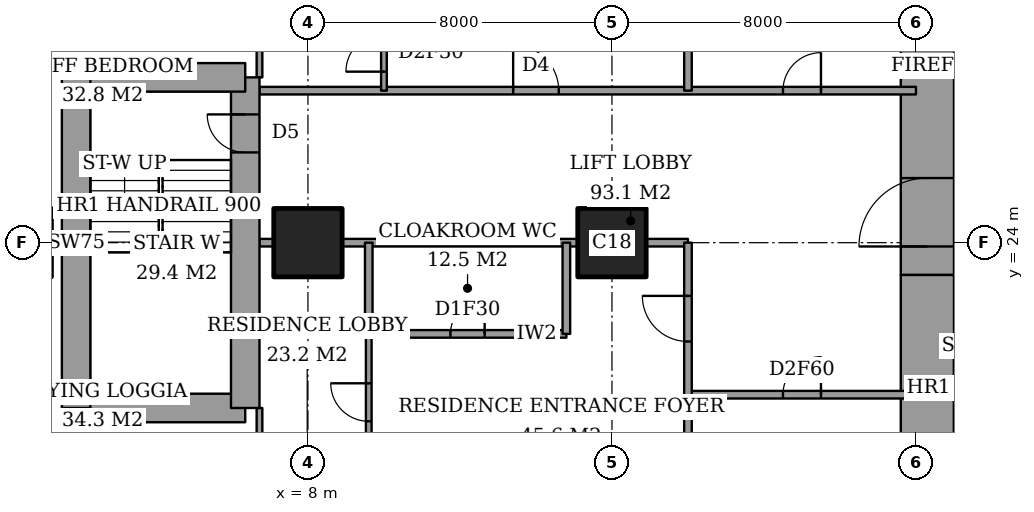
"""IFC4 building model, lengths in metres.
Left out: names, types, materials, properties, quantities, classifications, styles, units other than length and angle.
Written with IfcOpenShell. Run it as: python <this file> out.ifc"""

import sys

from ifc_helpers import new_model, si_unit, direction, frame, frame_2d, origin, origin_2d, place, context, subcontext, project, spatial, rectangle, extrude, element, fill, save


model = new_model("IFC4")
c1 = context("Model", 3, precision=1e-05, world=origin(), true_north=direction((0.0, 1.0)))
c2 = subcontext(c1, "Body", "Model", "MODEL_VIEW")
j1 = project(units=[si_unit("LENGTHUNIT", "METRE"), si_unit("PLANEANGLEUNIT", "RADIAN")], contexts=[c1])
p1 = place(None, origin())
s1 = spatial("IfcSite", under=j1, at=p1, CompositionType="ELEMENT")
p2 = place(p1, origin())
s2 = spatial("IfcBuilding", under=s1, at=p2, CompositionType="ELEMENT")
p3 = place(p2, frame((0.0, 0.0, 182.2)))
s3 = spatial("IfcBuildingStorey", under=s2, at=p3, CompositionType="ELEMENT", Elevation=182.2)
for number, where, z_axis, x_axis in (
    (1, (8.0, 24.0, 0.0), (0.0, 0.0, 1.0), (1.0, 0.0, 0.0)),
    (2, (16.0, 24.0, 0.0), (0.0, 0.0, 1.0), (1.0, 0.0, 0.0)),
):
    element("IfcColumn", number, at=place(p3, frame(where, z_axis=z_axis, x_axis=x_axis)), inside=s3, PredefinedType="COLUMN", context=c2, shape_type="SweptSolid", body=[
        extrude(rectangle(XDim=1.8, YDim=1.8, at=origin_2d()), origin(), (0.0, 0.0, 1.0), 3.6),
    ])
p4 = place(p3, frame((24.3, 13.0, 0.0), z_axis=(0.0, 0.0, 1.0), x_axis=(0.0, 1.0, 0.0)))
e3 = element("IfcWall", 3, at=p4, inside=s3, PredefinedType="SHEAR", context=c2, shape_type="SweptSolid", body=[
    extrude(rectangle(XDim=10.15, YDim=1.4, at=frame_2d((5.075, 0.0))), origin(), (0.0, 0.0, 1.0), 3.6),
])
p5 = place(p3, frame((24.3, 23.15, 0.0), z_axis=(0.0, 0.0, 1.0), x_axis=(0.0, 1.0, 0.0)))
e4 = element("IfcWall", 4, at=p5, inside=s3, PredefinedType="SHEAR", context=c2, shape_type="SweptSolid", body=[
    extrude(rectangle(XDim=11.85, YDim=1.4, at=frame_2d((5.925, 0.0))), origin(), (0.0, 0.0, 1.0), 3.6),
])
p6 = place(p5, frame((0.75, 0.0, 0.0)))
e5 = element("IfcOpeningElement", 5, at=p6, cuts=e4, PredefinedType="OPENING", context=c2, shape_type="SweptSolid", body=[
    extrude(rectangle(XDim=1.8, YDim=2.4, at=frame_2d((0.9, 1.2))), frame((0.0, 0.71, 0.0), z_axis=(0.0, -1.0, 0.0), x_axis=(1.0, 0.0, 0.0)), (0.0, 0.0, 1.0), 1.42),
])
p7 = place(p3, frame((1.9, 19.65, 0.0), z_axis=(0.0, 0.0, 1.0), x_axis=(1.0, 0.0, 0.0)))
e6 = element("IfcWall", 6, at=p7, inside=s3, PredefinedType="SHEAR", context=c2, shape_type="SweptSolid", body=[
    extrude(rectangle(XDim=4.45, YDim=0.75, at=frame_2d((2.225, 0.0))), origin(), (0.0, 0.0, 1.0), 3.6),
])
p8 = place(p3, frame((6.35, 19.65, 0.0), z_axis=(0.0, 0.0, 1.0), x_axis=(0.0, 1.0, 0.0)))
e7 = element("IfcWall", 7, at=p8, inside=s3, PredefinedType="SHEAR", context=c2, shape_type="SweptSolid", body=[
    extrude(rectangle(XDim=8.7, YDim=0.75, at=frame_2d((4.35, 0.0))), origin(), (0.0, 0.0, 1.0), 3.6),
])
p9 = place(p8, frame((6.725, 0.0, 0.0)))
e8 = element("IfcOpeningElement", 8, at=p9, cuts=e7, PredefinedType="OPENING", context=c2, shape_type="SweptSolid", body=[
    extrude(rectangle(XDim=1.0, YDim=2.1, at=frame_2d((0.5, 1.05))), frame((0.0, 0.385, 0.0), z_axis=(0.0, -1.0, 0.0), x_axis=(1.0, 0.0, 0.0)), (0.0, 0.0, 1.0), 0.77),
])
p10 = place(p3, frame((6.35, 28.35, 0.0), z_axis=(0.0, 0.0, 1.0), x_axis=(-1.0, 0.0, 0.0)))
e9 = element("IfcWall", 9, at=p10, inside=s3, PredefinedType="SHEAR", context=c2, shape_type="SweptSolid", body=[
    extrude(rectangle(XDim=4.45, YDim=0.75, at=frame_2d((2.225, 0.0))), origin(), (0.0, 0.0, 1.0), 3.6),
])
p11 = place(p3, frame((1.9, 28.35, 0.0), z_axis=(0.0, 0.0, 1.0), x_axis=(0.0, -1.0, 0.0)))
e10 = element("IfcWall", 10, at=p11, inside=s3, PredefinedType="SHEAR", context=c2, shape_type="SweptSolid", body=[
    extrude(rectangle(XDim=8.7, YDim=0.75, at=frame_2d((4.35, 0.0))), origin(), (0.0, 0.0, 1.0), 3.6),
])
p12 = place(p3, frame((18.0, 20.0, 0.0), z_axis=(0.0, 0.0, 1.0), x_axis=(1.0, 0.0, 0.0)))
e11 = element("IfcWall", 11, at=p12, inside=s3, PredefinedType="PARTITIONING", context=c2, shape_type="SweptSolid", body=[
    extrude(rectangle(XDim=6.0, YDim=0.2, at=frame_2d((3.0, 0.0))), origin(), (0.0, 0.0, 1.0), 3.35),
])
p13 = place(p12, frame((2.5, 0.0, 0.0)))
e12 = element("IfcOpeningElement", 12, at=p13, cuts=e11, PredefinedType="OPENING", context=c2, shape_type="SweptSolid", body=[
    extrude(rectangle(XDim=1.0, YDim=2.1, at=frame_2d((0.5, 1.05))), frame((0.0, 0.11, 0.0), z_axis=(0.0, -1.0, 0.0), x_axis=(1.0, 0.0, 0.0)), (0.0, 0.0, 1.0), 0.22),
])
p14 = place(p3, frame((9.6, 21.6, 0.0), z_axis=(0.0, 0.0, 1.0), x_axis=(1.0, 0.0, 0.0)))
e13 = element("IfcWall", 13, at=p14, inside=s3, PredefinedType="PARTITIONING", context=c2, shape_type="SweptSolid", body=[
    extrude(rectangle(XDim=5.2, YDim=0.2, at=frame_2d((2.6, 0.0))), origin(), (0.0, 0.0, 1.0), 3.35),
])
p15 = place(p14, frame((2.15, 0.0, 0.0)))
e14 = element("IfcOpeningElement", 14, at=p15, cuts=e13, PredefinedType="OPENING", context=c2, shape_type="SweptSolid", body=[
    extrude(rectangle(XDim=0.9, YDim=2.1, at=frame_2d((0.45, 1.05))), frame((0.0, 0.11, 0.0), z_axis=(0.0, -1.0, 0.0), x_axis=(1.0, 0.0, 0.0)), (0.0, 0.0, 1.0), 0.22),
])
p16 = place(p3, frame((6.725, 24.0, 0.0), z_axis=(0.0, 0.0, 1.0), x_axis=(1.0, 0.0, 0.0)))
e15 = element("IfcWall", 15, at=p16, inside=s3, PredefinedType="PARTITIONING", context=c2, shape_type="SweptSolid", body=[
    extrude(rectangle(XDim=0.375, YDim=0.2, at=frame_2d((0.188, 0.0))), origin(), (0.0, 0.0, 1.0), 3.35),
])
p17 = place(p3, frame((8.9, 24.0, 0.0), z_axis=(0.0, 0.0, 1.0), x_axis=(1.0, 0.0, 0.0)))
e16 = element("IfcWall", 16, at=p17, inside=s3, PredefinedType="PARTITIONING", context=c2, shape_type="SweptSolid", body=[
    extrude(rectangle(XDim=6.2, YDim=0.2, at=frame_2d((3.1, 0.0))), origin(), (0.0, 0.0, 1.0), 3.35),
])
p18 = place(p3, frame((16.9, 24.0, 0.0), z_axis=(0.0, 0.0, 1.0), x_axis=(1.0, 0.0, 0.0)))
e17 = element("IfcWall", 17, at=p18, inside=s3, PredefinedType="PARTITIONING", context=c2, shape_type="SweptSolid", body=[
    extrude(rectangle(XDim=1.1, YDim=0.2, at=frame_2d((0.55, 0.0))), origin(), (0.0, 0.0, 1.0), 3.35),
])
p19 = place(p3, frame((6.725, 28.0, 0.0), z_axis=(0.0, 0.0, 1.0), x_axis=(1.0, 0.0, 0.0)))
e18 = element("IfcWall", 18, at=p19, inside=s3, PredefinedType="PARTITIONING", context=c2, shape_type="SweptSolid", body=[
    extrude(rectangle(XDim=17.275, YDim=0.2, at=frame_2d((8.637, 0.0))), origin(), (0.0, 0.0, 1.0), 3.35),
])
p20 = place(p19, frame((6.675, 0.0, 0.0)))
e19 = element("IfcOpeningElement", 19, at=p20, cuts=e18, PredefinedType="OPENING", context=c2, shape_type="SweptSolid", body=[
    extrude(rectangle(XDim=1.2, YDim=2.4, at=frame_2d((0.6, 1.2))), frame((0.0, 0.11, 0.0), z_axis=(0.0, -1.0, 0.0), x_axis=(1.0, 0.0, 0.0)), (0.0, 0.0, 1.0), 0.22),
])
p21 = place(p19, frame((13.775, 0.0, 0.0)))
e20 = element("IfcOpeningElement", 20, at=p21, cuts=e18, PredefinedType="OPENING", context=c2, shape_type="SweptSolid", body=[
    extrude(rectangle(XDim=1.0, YDim=2.1, at=frame_2d((0.5, 1.05))), frame((0.0, 0.11, 0.0), z_axis=(0.0, -1.0, 0.0), x_axis=(1.0, 0.0, 0.0)), (0.0, 0.0, 1.0), 0.22),
])
p22 = place(p3, frame((6.725, 17.2, 0.0), z_axis=(0.0, 0.0, 1.0), x_axis=(0.0, 1.0, 0.0)))
e21 = element("IfcWall", 21, at=p22, inside=s3, PredefinedType="PARTITIONING", context=c2, shape_type="SweptSolid", body=[
    extrude(rectangle(XDim=2.45, YDim=0.15, at=frame_2d((1.225, 0.0))), origin(), (0.0, 0.0, 1.0), 3.35),
])
p23 = place(p22, frame((0.587, 0.0, 0.0)))
e22 = element("IfcOpeningElement", 22, at=p23, cuts=e21, PredefinedType="OPENING", context=c2, shape_type="SweptSolid", body=[
    extrude(rectangle(XDim=0.9, YDim=2.1, at=frame_2d((0.45, 1.05))), frame((0.0, 0.085, 0.0), z_axis=(0.0, -1.0, 0.0), x_axis=(1.0, 0.0, 0.0)), (0.0, 0.0, 1.0), 0.17),
])
p24 = place(p3, frame((6.725, 28.35, 0.0), z_axis=(0.0, 0.0, 1.0), x_axis=(0.0, 1.0, 0.0)))
e23 = element("IfcWall", 23, at=p24, inside=s3, PredefinedType="PARTITIONING", context=c2, shape_type="SweptSolid", body=[
    extrude(rectangle(XDim=2.45, YDim=0.15, at=frame_2d((1.225, 0.0))), origin(), (0.0, 0.0, 1.0), 3.35),
])
p25 = place(p24, frame((0.913, 0.0, 0.0)))
e24 = element("IfcOpeningElement", 24, at=p25, cuts=e23, PredefinedType="OPENING", context=c2, shape_type="SweptSolid", body=[
    extrude(rectangle(XDim=1.0, YDim=2.1, at=frame_2d((0.5, 1.05))), frame((0.0, 0.085, 0.0), z_axis=(0.0, -1.0, 0.0), x_axis=(1.0, 0.0, 0.0)), (0.0, 0.0, 1.0), 0.17),
])
p26 = place(p3, frame((9.6, 21.6, 0.0), z_axis=(0.0, 0.0, 1.0), x_axis=(0.0, 1.0, 0.0)))
e25 = element("IfcWall", 25, at=p26, inside=s3, PredefinedType="PARTITIONING", context=c2, shape_type="SweptSolid", body=[
    extrude(rectangle(XDim=2.4, YDim=0.2, at=frame_2d((1.2, 0.0))), origin(), (0.0, 0.0, 1.0), 3.35),
])
p27 = place(p3, frame((9.6, 10.6, 0.0), z_axis=(0.0, 0.0, 1.0), x_axis=(0.0, 1.0, 0.0)))
e26 = element("IfcWall", 26, at=p27, inside=s3, PredefinedType="PARTITIONING", context=c2, shape_type="SweptSolid", body=[
    extrude(rectangle(XDim=11.0, YDim=0.15, at=frame_2d((5.5, 0.0))), origin(), (0.0, 0.0, 1.0), 3.35),
])
p28 = place(p27, frame((8.7, 0.0, 0.0)))
e27 = element("IfcOpeningElement", 27, at=p28, cuts=e26, PredefinedType="OPENING", context=c2, shape_type="SweptSolid", body=[
    extrude(rectangle(XDim=1.0, YDim=2.1, at=frame_2d((0.5, 1.05))), frame((0.0, 0.085, 0.0), z_axis=(0.0, -1.0, 0.0), x_axis=(1.0, 0.0, 0.0)), (0.0, 0.0, 1.0), 0.17),
])
p29 = place(p3, frame((10.0, 28.0, 0.0), z_axis=(0.0, 0.0, 1.0), x_axis=(0.0, 1.0, 0.0)))
e28 = element("IfcWall", 28, at=p29, inside=s3, PredefinedType="PARTITIONING", context=c2, shape_type="SweptSolid", body=[
    extrude(rectangle(XDim=9.4, YDim=0.15, at=frame_2d((4.7, 0.0))), origin(), (0.0, 0.0, 1.0), 3.35),
])
p30 = place(p29, frame((0.5, 0.0, 0.0)))
e29 = element("IfcOpeningElement", 29, at=p30, cuts=e28, PredefinedType="OPENING", context=c2, shape_type="SweptSolid", body=[
    extrude(rectangle(XDim=1.0, YDim=2.1, at=frame_2d((0.5, 1.05))), frame((0.0, 0.085, 0.0), z_axis=(0.0, -1.0, 0.0), x_axis=(1.0, 0.0, 0.0)), (0.0, 0.0, 1.0), 0.17),
])
p31 = place(p3, frame((14.8, 21.6, 0.0), z_axis=(0.0, 0.0, 1.0), x_axis=(0.0, 1.0, 0.0)))
e30 = element("IfcWall", 30, at=p31, inside=s3, PredefinedType="PARTITIONING", context=c2, shape_type="SweptSolid", body=[
    extrude(rectangle(XDim=2.4, YDim=0.2, at=frame_2d((1.2, 0.0))), origin(), (0.0, 0.0, 1.0), 3.35),
])
p32 = place(p3, frame((18.0, 9.8, 0.0), z_axis=(0.0, 0.0, 1.0), x_axis=(0.0, 1.0, 0.0)))
e31 = element("IfcWall", 31, at=p32, inside=s3, PredefinedType="PARTITIONING", context=c2, shape_type="SweptSolid", body=[
    extrude(rectangle(XDim=14.2, YDim=0.2, at=frame_2d((7.1, 0.0))), origin(), (0.0, 0.0, 1.0), 3.35),
])
p33 = place(p32, frame((11.6, 0.0, 0.0)))
e32 = element("IfcOpeningElement", 32, at=p33, cuts=e31, PredefinedType="OPENING", context=c2, shape_type="SweptSolid", body=[
    extrude(rectangle(XDim=1.2, YDim=2.4, at=frame_2d((0.6, 1.2))), frame((0.0, 0.11, 0.0), z_axis=(0.0, -1.0, 0.0), x_axis=(1.0, 0.0, 0.0)), (0.0, 0.0, 1.0), 0.22),
])
p34 = place(p3, frame((18.0, 28.0, 0.0), z_axis=(0.0, 0.0, 1.0), x_axis=(0.0, 1.0, 0.0)))
e33 = element("IfcWall", 33, at=p34, inside=s3, PredefinedType="PARTITIONING", context=c2, shape_type="SweptSolid", body=[
    extrude(rectangle(XDim=10.2, YDim=0.2, at=frame_2d((5.1, 0.0))), origin(), (0.0, 0.0, 1.0), 3.35),
])
p35 = place(p28, origin())
e34 = element("IfcDoor", 34, at=p35, inside=s3, OperationType="SINGLE_SWING_LEFT", PredefinedType="DOOR", context=c2, shape_type="SweptSolid", body=[
    extrude(rectangle(XDim=1.0, YDim=2.1, at=frame_2d((0.5, 1.05))), frame((0.0, 0.025, 0.0), z_axis=(0.0, -1.0, 0.0), x_axis=(1.0, 0.0, 0.0)), (0.0, 0.0, 1.0), 0.05),
])
fill(e27, e34)
p36 = place(p15, origin())
e35 = element("IfcDoor", 35, at=p36, inside=s3, OperationType="SINGLE_SWING_LEFT", PredefinedType="DOOR", context=c2, shape_type="SweptSolid", body=[
    extrude(rectangle(XDim=0.9, YDim=2.1, at=frame_2d((0.45, 1.05))), frame((0.0, 0.025, 0.0), z_axis=(0.0, -1.0, 0.0), x_axis=(1.0, 0.0, 0.0)), (0.0, 0.0, 1.0), 0.05),
])
fill(e14, e35)
p37 = place(p33, origin())
e36 = element("IfcDoor", 36, at=p37, inside=s3, OperationType="SINGLE_SWING_LEFT", PredefinedType="DOOR", context=c2, shape_type="SweptSolid", body=[
    extrude(rectangle(XDim=1.2, YDim=2.4, at=frame_2d((0.6, 1.2))), frame((0.0, 0.025, 0.0), z_axis=(0.0, -1.0, 0.0), x_axis=(1.0, 0.0, 0.0)), (0.0, 0.0, 1.0), 0.05),
])
fill(e32, e36)
p38 = place(p30, origin())
e37 = element("IfcDoor", 37, at=p38, inside=s3, OperationType="SINGLE_SWING_RIGHT", PredefinedType="DOOR", context=c2, shape_type="SweptSolid", body=[
    extrude(rectangle(XDim=1.0, YDim=2.1, at=frame_2d((0.5, 1.05))), frame((0.0, 0.025, 0.0), z_axis=(0.0, -1.0, 0.0), x_axis=(1.0, 0.0, 0.0)), (0.0, 0.0, 1.0), 0.05),
])
fill(e29, e37)
p39 = place(p20, origin())
e38 = element("IfcDoor", 38, at=p39, inside=s3, OperationType="SINGLE_SWING_RIGHT", PredefinedType="DOOR", context=c2, shape_type="SweptSolid", body=[
    extrude(rectangle(XDim=1.2, YDim=2.4, at=frame_2d((0.6, 1.2))), frame((0.0, 0.025, 0.0), z_axis=(0.0, -1.0, 0.0), x_axis=(1.0, 0.0, 0.0)), (0.0, 0.0, 1.0), 0.05),
])
fill(e19, e38)
p40 = place(p21, origin())
e39 = element("IfcDoor", 39, at=p40, inside=s3, OperationType="SINGLE_SWING_LEFT", PredefinedType="DOOR", context=c2, shape_type="SweptSolid", body=[
    extrude(rectangle(XDim=1.0, YDim=2.1, at=frame_2d((0.5, 1.05))), frame((0.0, 0.025, 0.0), z_axis=(0.0, -1.0, 0.0), x_axis=(1.0, 0.0, 0.0)), (0.0, 0.0, 1.0), 0.05),
])
fill(e20, e39)
p41 = place(p13, origin())
e40 = element("IfcDoor", 40, at=p41, inside=s3, OperationType="SINGLE_SWING_LEFT", PredefinedType="DOOR", context=c2, shape_type="SweptSolid", body=[
    extrude(rectangle(XDim=1.0, YDim=2.1, at=frame_2d((0.5, 1.05))), frame((0.0, 0.025, 0.0), z_axis=(0.0, -1.0, 0.0), x_axis=(1.0, 0.0, 0.0)), (0.0, 0.0, 1.0), 0.05),
])
fill(e12, e40)
p42 = place(p6, origin())
e41 = element("IfcDoor", 41, at=p42, inside=s3, OperationType="DOUBLE_DOOR_DOUBLE_SWING", PredefinedType="DOOR", context=c2, shape_type="SweptSolid", body=[
    extrude(rectangle(XDim=1.8, YDim=2.4, at=frame_2d((0.9, 1.2))), frame((0.0, 0.025, 0.0), z_axis=(0.0, -1.0, 0.0), x_axis=(1.0, 0.0, 0.0)), (0.0, 0.0, 1.0), 0.05),
])
fill(e5, e41)
p43 = place(p9, origin())
e42 = element("IfcDoor", 42, at=p43, inside=s3, OperationType="SINGLE_SWING_LEFT", PredefinedType="DOOR", context=c2, shape_type="SweptSolid", body=[
    extrude(rectangle(XDim=1.0, YDim=2.1, at=frame_2d((0.5, 1.05))), frame((0.0, 0.025, 0.0), z_axis=(0.0, -1.0, 0.0), x_axis=(1.0, 0.0, 0.0)), (0.0, 0.0, 1.0), 0.05),
])
fill(e8, e42)
save(model, sys.argv[1])
